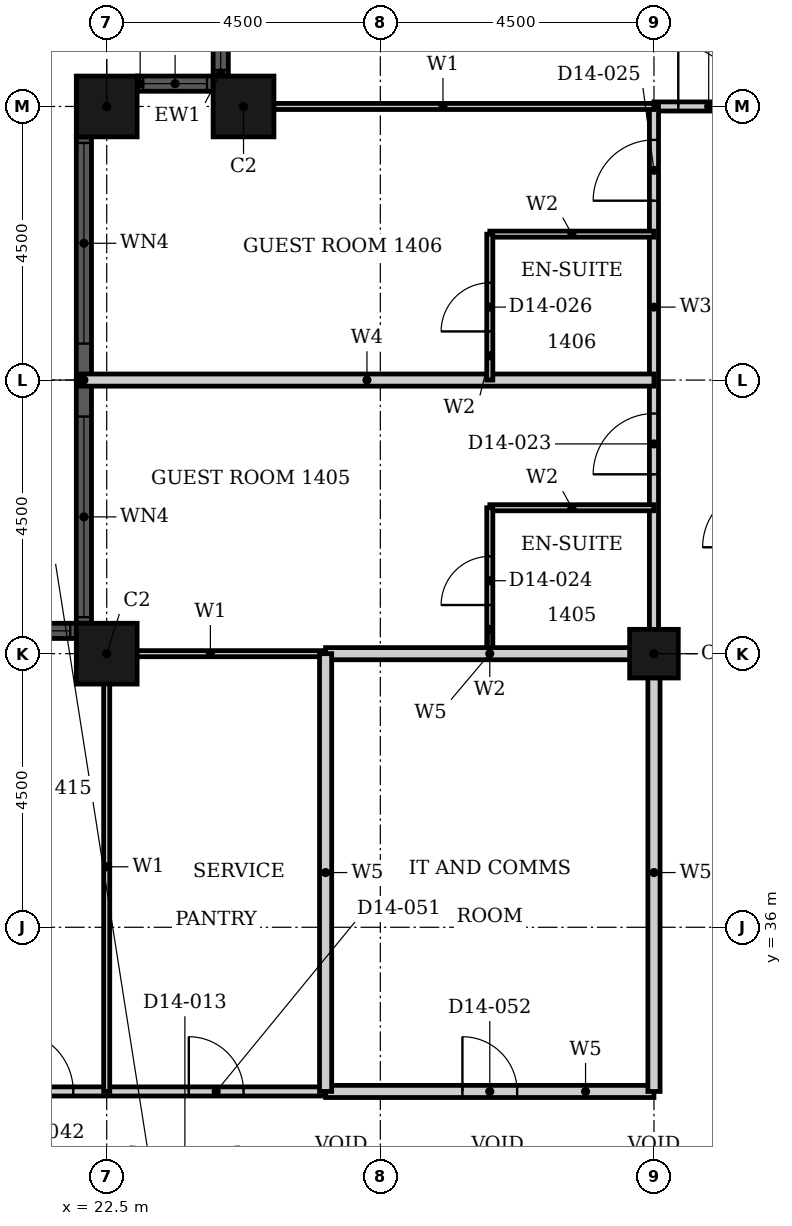
"""IFC4 building model, lengths in metres.
Left out: names, types, materials, properties, quantities, classifications, styles, units other than length and angle.
Written with IfcOpenShell. Run it as: python <this file> out.ifc"""

import sys

from ifc_helpers import new_model, si_unit, direction, frame, frame_2d, origin, origin_2d, place, context, subcontext, project, spatial, rectangle, hollow_rectangle, extrude, element, fill, save


model = new_model("IFC4")
c1 = context("Model", 3, precision=1e-05, world=origin(), true_north=direction((0.0, 1.0)))
c2 = subcontext(c1, "Body", "Model", "MODEL_VIEW")
j1 = project(units=[si_unit("LENGTHUNIT", "METRE"), si_unit("PLANEANGLEUNIT", "RADIAN")], contexts=[c1])
p1 = place(None, origin())
s1 = spatial("IfcSite", under=j1, at=p1, CompositionType="ELEMENT")
p2 = place(p1, origin())
s2 = spatial("IfcBuilding", under=s1, at=p2, CompositionType="ELEMENT")
p3 = place(p2, frame((0.0, 0.0, 63.6)))
s3 = spatial("IfcBuildingStorey", under=s2, at=p3, CompositionType="ELEMENT", Elevation=63.6)
for number, where, z_axis, x_axis in (
    (1, (24.75, 49.5, 0.0), (0.0, 0.0, 1.0), (1.0, 0.0, 0.0)),
    (2, (22.5, 49.5, 0.0), (0.0, 0.0, 1.0), (1.0, 0.0, 0.0)),
    (3, (22.5, 40.5, 0.0), (0.0, 0.0, 1.0), (1.0, 0.0, 0.0)),
):
    element("IfcColumn", number, at=place(p3, frame(where, z_axis=z_axis, x_axis=x_axis)), inside=s3, PredefinedType="COLUMN", context=c2, shape_type="SweptSolid", body=[
        extrude(hollow_rectangle(XDim=1.0, YDim=1.0, WallThickness=0.032, at=origin_2d()), origin(), (0.0, 0.0, 1.0), 3.6),
    ])
p4 = place(p3, frame((31.5, 40.5, 0.0), z_axis=(0.0, 0.0, 1.0), x_axis=(1.0, 0.0, 0.0)))
e4 = element("IfcColumn", 4, at=p4, inside=s3, PredefinedType="COLUMN", context=c2, shape_type="SweptSolid", body=[
    extrude(hollow_rectangle(XDim=0.8, YDim=0.8, WallThickness=0.025, at=origin_2d()), origin(), (0.0, 0.0, 1.0), 3.6),
])
p5 = place(p3, frame((24.375, 51.25, 0.0), z_axis=(0.0, 0.0, 1.0), x_axis=(0.0, -1.0, 0.0)))
e5 = element("IfcWall", 5, at=p5, inside=s3, PredefinedType="SOLIDWALL", context=c2, shape_type="SweptSolid", body=[
    extrude(rectangle(XDim=1.25, YDim=0.25, at=frame_2d((0.625, 0.0))), origin(), (0.0, 0.0, 1.0), 3.6),
])
p6 = place(p5, frame((0.1, 0.0, 0.9)))
e6 = element("IfcOpeningElement", 6, at=p6, cuts=e5, PredefinedType="OPENING", context=c2, shape_type="SweptSolid", body=[
    extrude(rectangle(XDim=1.05, YDim=2.08, at=frame_2d((0.525, 1.04))), frame((0.0, 0.135, 0.0), z_axis=(0.0, -1.0, 0.0), x_axis=(1.0, 0.0, 0.0)), (0.0, 0.0, 1.0), 0.27),
])
p7 = place(p3, frame((24.25, 49.875, 0.0), z_axis=(0.0, 0.0, 1.0), x_axis=(-1.0, 0.0, 0.0)))
e7 = element("IfcWall", 7, at=p7, inside=s3, PredefinedType="SOLIDWALL", context=c2, shape_type="SweptSolid", body=[
    extrude(rectangle(XDim=1.25, YDim=0.25, at=frame_2d((0.625, 0.0))), origin(), (0.0, 0.0, 1.0), 3.6),
])
p8 = place(p7, frame((0.1, 0.0, 0.9)))
e8 = element("IfcOpeningElement", 8, at=p8, cuts=e7, PredefinedType="OPENING", context=c2, shape_type="SweptSolid", body=[
    extrude(rectangle(XDim=1.05, YDim=2.08, at=frame_2d((0.525, 1.04))), frame((0.0, 0.135, 0.0), z_axis=(0.0, -1.0, 0.0), x_axis=(1.0, 0.0, 0.0)), (0.0, 0.0, 1.0), 0.27),
])
p9 = place(p3, frame((22.125, 49.0, 0.0), z_axis=(0.0, 0.0, 1.0), x_axis=(0.0, -1.0, 0.0)))
e9 = element("IfcWall", 9, at=p9, inside=s3, PredefinedType="SOLIDWALL", context=c2, shape_type="SweptSolid", body=[
    extrude(rectangle(XDim=8.0, YDim=0.25, at=frame_2d((4.0, 0.0))), origin(), (0.0, 0.0, 1.0), 3.6),
])
p10 = place(p9, frame((0.1, 0.0, 0.9)))
e10 = element("IfcOpeningElement", 10, at=p10, cuts=e9, PredefinedType="OPENING", context=c2, shape_type="SweptSolid", body=[
    extrude(rectangle(XDim=3.3, YDim=2.08, at=frame_2d((1.65, 1.04))), frame((0.0, 0.135, 0.0), z_axis=(0.0, -1.0, 0.0), x_axis=(1.0, 0.0, 0.0)), (0.0, 0.0, 1.0), 0.27),
])
p11 = place(p9, frame((4.6, 0.0, 0.9)))
e11 = element("IfcOpeningElement", 11, at=p11, cuts=e9, PredefinedType="OPENING", context=c2, shape_type="SweptSolid", body=[
    extrude(rectangle(XDim=3.3, YDim=2.08, at=frame_2d((1.65, 1.04))), frame((0.0, 0.135, 0.0), z_axis=(0.0, -1.0, 0.0), x_axis=(1.0, 0.0, 0.0)), (0.0, 0.0, 1.0), 0.27),
])
p12 = place(p3, frame((22.0, 40.875, 0.0), z_axis=(0.0, 0.0, 1.0), x_axis=(-1.0, 0.0, 0.0)))
e12 = element("IfcWall", 12, at=p12, inside=s3, PredefinedType="SOLIDWALL", context=c2, shape_type="SweptSolid", body=[
    extrude(rectangle(XDim=3.5, YDim=0.25, at=frame_2d((1.75, 0.0))), origin(), (0.0, 0.0, 1.0), 3.6),
])
p13 = place(p12, frame((0.1, 0.0, 0.9)))
e13 = element("IfcOpeningElement", 13, at=p13, cuts=e12, PredefinedType="OPENING", context=c2, shape_type="SweptSolid", body=[
    extrude(rectangle(XDim=3.3, YDim=2.08, at=frame_2d((1.65, 1.04))), frame((0.0, 0.135, 0.0), z_axis=(0.0, -1.0, 0.0), x_axis=(1.0, 0.0, 0.0)), (0.0, 0.0, 1.0), 0.27),
])
p14 = place(p3, frame((16.2, 33.3, 0.0), z_axis=(0.0, 0.0, 1.0), x_axis=(1.0, 0.0, 0.0)))
e14 = element("IfcWall", 14, at=p14, inside=s3, PredefinedType="PARTITIONING", context=c2, shape_type="SweptSolid", body=[
    extrude(rectangle(XDim=9.9, YDim=0.15, at=frame_2d((4.95, 0.0))), origin(), (0.0, 0.0, 1.0), 3.3),
])
p15 = place(p14, frame((4.75, 0.0, 0.0)))
e15 = element("IfcOpeningElement", 15, at=p15, cuts=e14, PredefinedType="OPENING", context=c2, shape_type="SweptSolid", body=[
    extrude(rectangle(XDim=1.0, YDim=2.1, at=frame_2d((0.5, 1.05))), frame((0.0, 0.085, 0.0), z_axis=(0.0, -1.0, 0.0), x_axis=(1.0, 0.0, 0.0)), (0.0, 0.0, 1.0), 0.17),
])
p16 = place(p14, frame((7.65, 0.0, 0.0)))
e16 = element("IfcOpeningElement", 16, at=p16, cuts=e14, PredefinedType="OPENING", context=c2, shape_type="SweptSolid", body=[
    extrude(rectangle(XDim=0.9, YDim=2.1, at=frame_2d((0.45, 1.05))), frame((0.0, 0.085, 0.0), z_axis=(0.0, -1.0, 0.0), x_axis=(1.0, 0.0, 0.0)), (0.0, 0.0, 1.0), 0.17),
])
p17 = place(p3, frame((31.5, 49.5, 0.0), z_axis=(0.0, 0.0, 1.0), x_axis=(1.0, 0.0, 0.0)))
e17 = element("IfcWall", 17, at=p17, inside=s3, PredefinedType="PARTITIONING", context=c2, shape_type="SweptSolid", body=[
    extrude(rectangle(XDim=1.8, YDim=0.15, at=frame_2d((0.9, 0.0))), origin(), (0.0, 0.0, 1.0), 3.3),
])
p18 = place(p17, frame((0.4, 0.0, 0.0)))
e18 = element("IfcOpeningElement", 18, at=p18, cuts=e17, PredefinedType="OPENING", context=c2, shape_type="SweptSolid", body=[
    extrude(rectangle(XDim=1.0, YDim=2.1, at=frame_2d((0.5, 1.05))), frame((0.0, 0.085, 0.0), z_axis=(0.0, -1.0, 0.0), x_axis=(1.0, 0.0, 0.0)), (0.0, 0.0, 1.0), 0.17),
])
p19 = place(p3, frame((31.5, 40.5, 0.0), z_axis=(0.0, 0.0, 1.0), x_axis=(0.0, 1.0, 0.0)))
e19 = element("IfcWall", 19, at=p19, inside=s3, PredefinedType="PARTITIONING", context=c2, shape_type="SweptSolid", body=[
    extrude(rectangle(XDim=9.0, YDim=0.15, at=frame_2d((4.5, 0.0))), origin(), (0.0, 0.0, 1.0), 2.58),
])
p20 = place(p19, frame((2.95, 0.0, 0.0)))
e20 = element("IfcOpeningElement", 20, at=p20, cuts=e19, PredefinedType="OPENING", context=c2, shape_type="SweptSolid", body=[
    extrude(rectangle(XDim=1.0, YDim=2.1, at=frame_2d((0.5, 1.05))), frame((0.0, 0.085, 0.0), z_axis=(0.0, -1.0, 0.0), x_axis=(1.0, 0.0, 0.0)), (0.0, 0.0, 1.0), 0.17),
])
p21 = place(p19, frame((7.45, 0.0, 0.0)))
e21 = element("IfcOpeningElement", 21, at=p21, cuts=e19, PredefinedType="OPENING", context=c2, shape_type="SweptSolid", body=[
    extrude(rectangle(XDim=1.0, YDim=2.1, at=frame_2d((0.5, 1.05))), frame((0.0, 0.085, 0.0), z_axis=(0.0, -1.0, 0.0), x_axis=(1.0, 0.0, 0.0)), (0.0, 0.0, 1.0), 0.17),
])
p22 = place(p3, frame((22.31, 40.5, 0.0), z_axis=(0.0, 0.0, 1.0), x_axis=(1.0, 0.0, 0.0)))
e22 = element("IfcWall", 22, at=p22, inside=s3, PredefinedType="PARTITIONING", context=c2, shape_type="SweptSolid", body=[
    extrude(rectangle(XDim=3.79, YDim=0.1, at=frame_2d((1.895, 0.0))), origin(), (0.0, 0.0, 1.0), 2.38),
])
p23 = place(p3, frame((24.56, 49.5, 0.0), z_axis=(0.0, 0.0, 1.0), x_axis=(1.0, 0.0, 0.0)))
e23 = element("IfcWall", 23, at=p23, inside=s3, PredefinedType="PARTITIONING", context=c2, shape_type="SweptSolid", body=[
    extrude(rectangle(XDim=6.94, YDim=0.1, at=frame_2d((3.47, 0.0))), origin(), (0.0, 0.0, 1.0), 3.3),
])
p24 = place(p3, frame((22.5, 33.3, 0.0), z_axis=(0.0, 0.0, 1.0), x_axis=(0.0, 1.0, 0.0)))
e24 = element("IfcWall", 24, at=p24, inside=s3, PredefinedType="PARTITIONING", context=c2, shape_type="SweptSolid", body=[
    extrude(rectangle(XDim=7.39, YDim=0.1, at=frame_2d((3.695, 0.0))), origin(), (0.0, 0.0, 1.0), 3.3),
])
p25 = place(p3, frame((22.06, 45.0, 0.0), z_axis=(0.0, 0.0, 1.0), x_axis=(1.0, 0.0, 0.0)))
e25 = element("IfcWall", 25, at=p25, inside=s3, PredefinedType="PARTITIONING", context=c2, shape_type="SweptSolid", body=[
    extrude(rectangle(XDim=9.44, YDim=0.2, at=frame_2d((4.72, 0.0))), origin(), (0.0, 0.0, 1.0), 3.3),
])
for number, where, z_axis, x_axis in (
    (26, (28.8, 42.9, 0.0), (0.0, 0.0, 1.0), (1.0, 0.0, 0.0)),
    (27, (28.8, 47.4, 0.0), (0.0, 0.0, 1.0), (1.0, 0.0, 0.0)),
):
    element("IfcWall", number, at=place(p3, frame(where, z_axis=z_axis, x_axis=x_axis)), inside=s3, PredefinedType="PARTITIONING", context=c2, shape_type="SweptSolid", body=[
        extrude(rectangle(XDim=2.7, YDim=0.1, at=frame_2d((1.35, 0.0))), origin(), (0.0, 0.0, 1.0), 3.3),
    ])
p26 = place(p3, frame((28.8, 40.5, 0.0), z_axis=(0.0, 0.0, 1.0), x_axis=(0.0, 1.0, 0.0)))
e28 = element("IfcWall", 28, at=p26, inside=s3, PredefinedType="PARTITIONING", context=c2, shape_type="SweptSolid", body=[
    extrude(rectangle(XDim=2.4, YDim=0.1, at=frame_2d((1.2, 0.0))), origin(), (0.0, 0.0, 1.0), 3.3),
])
p27 = place(p26, frame((0.8, 0.0, 0.0)))
e29 = element("IfcOpeningElement", 29, at=p27, cuts=e28, PredefinedType="OPENING", context=c2, shape_type="SweptSolid", body=[
    extrude(rectangle(XDim=0.8, YDim=2.1, at=frame_2d((0.4, 1.05))), frame((0.0, 0.06, 0.0), z_axis=(0.0, -1.0, 0.0), x_axis=(1.0, 0.0, 0.0)), (0.0, 0.0, 1.0), 0.12),
])
p28 = place(p3, frame((28.8, 45.0, 0.0), z_axis=(0.0, 0.0, 1.0), x_axis=(0.0, 1.0, 0.0)))
e30 = element("IfcWall", 30, at=p28, inside=s3, PredefinedType="PARTITIONING", context=c2, shape_type="SweptSolid", body=[
    extrude(rectangle(XDim=2.4, YDim=0.1, at=frame_2d((1.2, 0.0))), origin(), (0.0, 0.0, 1.0), 3.3),
])
p29 = place(p28, frame((0.8, 0.0, 0.0)))
e31 = element("IfcOpeningElement", 31, at=p29, cuts=e30, PredefinedType="OPENING", context=c2, shape_type="SweptSolid", body=[
    extrude(rectangle(XDim=0.8, YDim=2.1, at=frame_2d((0.4, 1.05))), frame((0.0, 0.06, 0.0), z_axis=(0.0, -1.0, 0.0), x_axis=(1.0, 0.0, 0.0)), (0.0, 0.0, 1.0), 0.12),
])
p30 = place(p3, frame((26.1, 33.3, 0.0), z_axis=(0.0, 0.0, 1.0), x_axis=(1.0, 0.0, 0.0)))
e32 = element("IfcWall", 32, at=p30, inside=s3, PredefinedType="PARTITIONING", context=c2, shape_type="SweptSolid", body=[
    extrude(rectangle(XDim=5.4, YDim=0.2, at=frame_2d((2.7, 0.0))), origin(), (0.0, 0.0, 1.0), 3.3),
])
p31 = place(p30, frame((2.25, 0.0, 0.0)))
e33 = element("IfcOpeningElement", 33, at=p31, cuts=e32, PredefinedType="OPENING", context=c2, shape_type="SweptSolid", body=[
    extrude(rectangle(XDim=0.9, YDim=2.1, at=frame_2d((0.45, 1.05))), frame((0.0, 0.11, 0.0), z_axis=(0.0, -1.0, 0.0), x_axis=(1.0, 0.0, 0.0)), (0.0, 0.0, 1.0), 0.22),
])
p32 = place(p3, frame((26.1, 40.5, 0.0), z_axis=(0.0, 0.0, 1.0), x_axis=(1.0, 0.0, 0.0)))
e34 = element("IfcWall", 34, at=p32, inside=s3, PredefinedType="PARTITIONING", context=c2, shape_type="SweptSolid", body=[
    extrude(rectangle(XDim=5.4, YDim=0.2, at=frame_2d((2.7, 0.0))), origin(), (0.0, 0.0, 1.0), 2.38),
])
for number, where, z_axis, x_axis in (
    (35, (26.1, 33.3, 0.0), (0.0, 0.0, 1.0), (0.0, 1.0, 0.0)),
    (36, (31.5, 33.3, 0.0), (0.0, 0.0, 1.0), (0.0, 1.0, 0.0)),
):
    element("IfcWall", number, at=place(p3, frame(where, z_axis=z_axis, x_axis=x_axis)), inside=s3, PredefinedType="PARTITIONING", context=c2, shape_type="SweptSolid", body=[
        extrude(rectangle(XDim=7.2, YDim=0.2, at=frame_2d((3.6, 0.0))), origin(), (0.0, 0.0, 1.0), 3.3),
    ])
p33 = place(p6, origin())
e37 = element("IfcWindow", 37, at=p33, inside=s3, PartitioningType="SINGLE_PANEL", PredefinedType="WINDOW", context=c2, shape_type="SweptSolid", body=[
    extrude(rectangle(XDim=1.05, YDim=2.08, at=frame_2d((0.525, 1.04))), frame((0.0, 0.03, 0.0), z_axis=(0.0, -1.0, 0.0), x_axis=(1.0, 0.0, 0.0)), (0.0, 0.0, 1.0), 0.06),
])
fill(e6, e37)
p34 = place(p8, origin())
e38 = element("IfcWindow", 38, at=p34, inside=s3, PartitioningType="SINGLE_PANEL", PredefinedType="WINDOW", context=c2, shape_type="SweptSolid", body=[
    extrude(rectangle(XDim=1.05, YDim=2.08, at=frame_2d((0.525, 1.04))), frame((0.0, 0.03, 0.0), z_axis=(0.0, -1.0, 0.0), x_axis=(1.0, 0.0, 0.0)), (0.0, 0.0, 1.0), 0.06),
])
fill(e8, e38)
p35 = place(p10, origin())
e39 = element("IfcWindow", 39, at=p35, inside=s3, PartitioningType="SINGLE_PANEL", PredefinedType="WINDOW", context=c2, shape_type="SweptSolid", body=[
    extrude(rectangle(XDim=3.3, YDim=2.08, at=frame_2d((1.65, 1.04))), frame((0.0, 0.03, 0.0), z_axis=(0.0, -1.0, 0.0), x_axis=(1.0, 0.0, 0.0)), (0.0, 0.0, 1.0), 0.06),
])
fill(e10, e39)
p36 = place(p11, origin())
e40 = element("IfcWindow", 40, at=p36, inside=s3, PartitioningType="SINGLE_PANEL", PredefinedType="WINDOW", context=c2, shape_type="SweptSolid", body=[
    extrude(rectangle(XDim=3.3, YDim=2.08, at=frame_2d((1.65, 1.04))), frame((0.0, 0.03, 0.0), z_axis=(0.0, -1.0, 0.0), x_axis=(1.0, 0.0, 0.0)), (0.0, 0.0, 1.0), 0.06),
])
fill(e11, e40)
p37 = place(p13, origin())
e41 = element("IfcWindow", 41, at=p37, inside=s3, PartitioningType="SINGLE_PANEL", PredefinedType="WINDOW", context=c2, shape_type="SweptSolid", body=[
    extrude(rectangle(XDim=3.3, YDim=2.08, at=frame_2d((1.65, 1.04))), frame((0.0, 0.03, 0.0), z_axis=(0.0, -1.0, 0.0), x_axis=(1.0, 0.0, 0.0)), (0.0, 0.0, 1.0), 0.06),
])
fill(e13, e41)
p38 = place(p20, origin())
e42 = element("IfcDoor", 42, at=p38, inside=s3, OperationType="SINGLE_SWING_RIGHT", PredefinedType="DOOR", context=c2, shape_type="SweptSolid", body=[
    extrude(rectangle(XDim=1.0, YDim=2.1, at=frame_2d((0.5, 1.05))), frame((0.0, 0.025, 0.0), z_axis=(0.0, -1.0, 0.0), x_axis=(1.0, 0.0, 0.0)), (0.0, 0.0, 1.0), 0.05),
])
fill(e20, e42)
p39 = place(p27, origin())
e43 = element("IfcDoor", 43, at=p39, inside=s3, OperationType="SINGLE_SWING_RIGHT", PredefinedType="DOOR", context=c2, shape_type="SweptSolid", body=[
    extrude(rectangle(XDim=0.8, YDim=2.1, at=frame_2d((0.4, 1.05))), frame((0.0, 0.025, 0.0), z_axis=(0.0, -1.0, 0.0), x_axis=(1.0, 0.0, 0.0)), (0.0, 0.0, 1.0), 0.05),
])
fill(e29, e43)
p40 = place(p21, origin())
e44 = element("IfcDoor", 44, at=p40, inside=s3, OperationType="SINGLE_SWING_RIGHT", PredefinedType="DOOR", context=c2, shape_type="SweptSolid", body=[
    extrude(rectangle(XDim=1.0, YDim=2.1, at=frame_2d((0.5, 1.05))), frame((0.0, 0.025, 0.0), z_axis=(0.0, -1.0, 0.0), x_axis=(1.0, 0.0, 0.0)), (0.0, 0.0, 1.0), 0.05),
])
fill(e21, e44)
p41 = place(p29, origin())
e45 = element("IfcDoor", 45, at=p41, inside=s3, OperationType="SINGLE_SWING_LEFT", PredefinedType="DOOR", context=c2, shape_type="SweptSolid", body=[
    extrude(rectangle(XDim=0.8, YDim=2.1, at=frame_2d((0.4, 1.05))), frame((0.0, 0.025, 0.0), z_axis=(0.0, -1.0, 0.0), x_axis=(1.0, 0.0, 0.0)), (0.0, 0.0, 1.0), 0.05),
])
fill(e31, e45)
p42 = place(p18, origin())
e46 = element("IfcDoor", 46, at=p42, inside=s3, OperationType="SINGLE_SWING_LEFT", PredefinedType="DOOR", context=c2, shape_type="SweptSolid", body=[
    extrude(rectangle(XDim=1.0, YDim=2.1, at=frame_2d((0.5, 1.05))), frame((0.0, 0.025, 0.0), z_axis=(0.0, -1.0, 0.0), x_axis=(1.0, 0.0, 0.0)), (0.0, 0.0, 1.0), 0.05),
])
fill(e18, e46)
p43 = place(p15, origin())
e47 = element("IfcDoor", 47, at=p43, inside=s3, OperationType="SINGLE_SWING_RIGHT", PredefinedType="DOOR", context=c2, shape_type="SweptSolid", body=[
    extrude(rectangle(XDim=1.0, YDim=2.1, at=frame_2d((0.5, 1.05))), frame((0.0, 0.025, 0.0), z_axis=(0.0, -1.0, 0.0), x_axis=(1.0, 0.0, 0.0)), (0.0, 0.0, 1.0), 0.05),
])
fill(e15, e47)
p44 = place(p16, origin())
e48 = element("IfcDoor", 48, at=p44, inside=s3, OperationType="SINGLE_SWING_RIGHT", PredefinedType="DOOR", context=c2, shape_type="SweptSolid", body=[
    extrude(rectangle(XDim=0.9, YDim=2.1, at=frame_2d((0.45, 1.05))), frame((0.0, 0.025, 0.0), z_axis=(0.0, -1.0, 0.0), x_axis=(1.0, 0.0, 0.0)), (0.0, 0.0, 1.0), 0.05),
])
fill(e16, e48)
p45 = place(p31, origin())
e49 = element("IfcDoor", 49, at=p45, inside=s3, OperationType="SINGLE_SWING_LEFT", PredefinedType="DOOR", context=c2, shape_type="SweptSolid", body=[
    extrude(rectangle(XDim=0.9, YDim=2.1, at=frame_2d((0.45, 1.05))), frame((0.0, 0.025, 0.0), z_axis=(0.0, -1.0, 0.0), x_axis=(1.0, 0.0, 0.0)), (0.0, 0.0, 1.0), 0.05),
])
fill(e33, e49)
save(model, sys.argv[1])
